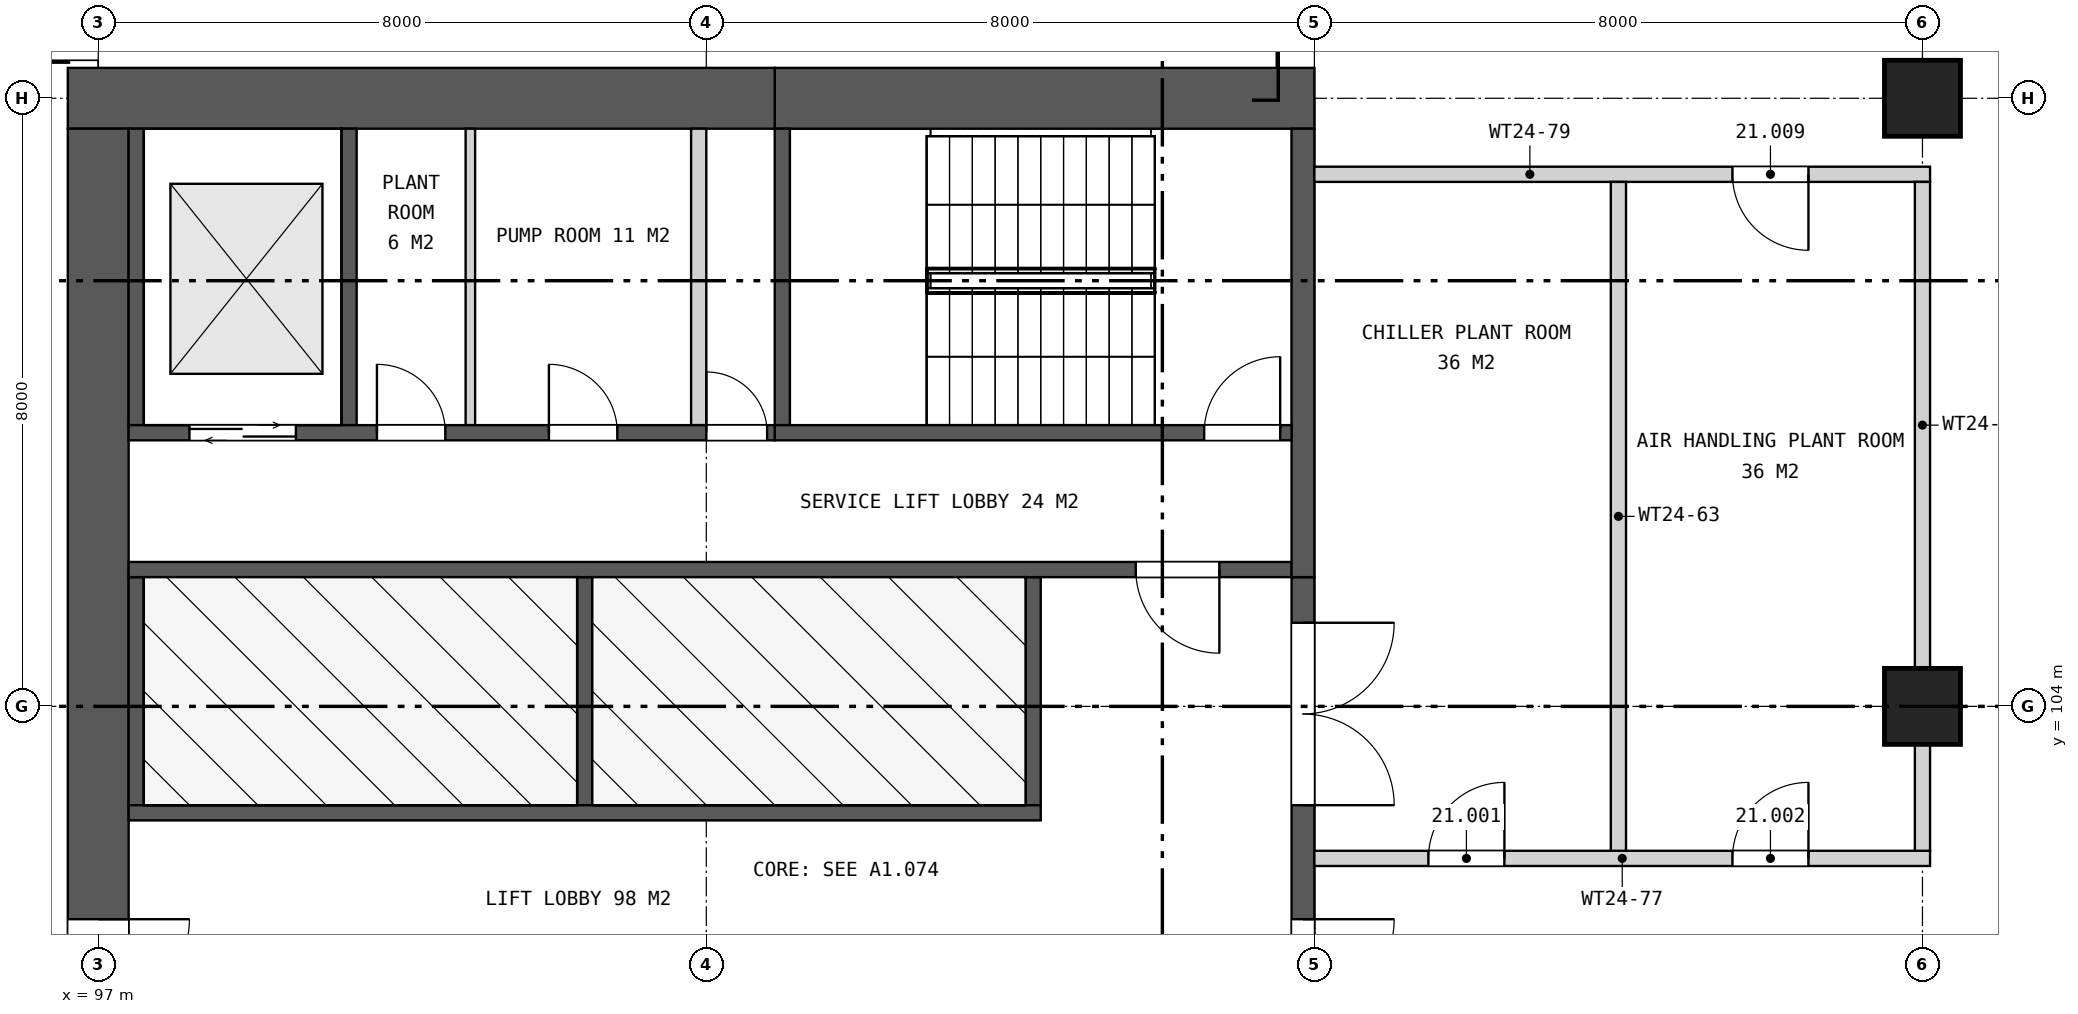
"""IFC4 building model, lengths in metres.
Left out: names, types, materials, properties, quantities, classifications, styles, units other than length and angle.
Written with IfcOpenShell. Run it as: python <this file> out.ifc"""

import sys

from ifc_helpers import new_model, si_unit, direction, frame, frame_2d, origin, origin_2d, place, context, subcontext, project, spatial, rectangle, extrude, element, fill, save


model = new_model("IFC4")
c1 = context("Model", 3, precision=1e-05, world=origin(), true_north=direction((0.0, 1.0)))
c2 = subcontext(c1, "Body", "Model", "MODEL_VIEW")
j1 = project(units=[si_unit("LENGTHUNIT", "METRE"), si_unit("PLANEANGLEUNIT", "RADIAN")], contexts=[c1])
p1 = place(None, origin())
s1 = spatial("IfcSite", under=j1, at=p1, CompositionType="ELEMENT")
p2 = place(p1, origin())
s2 = spatial("IfcBuilding", under=s1, at=p2, CompositionType="ELEMENT")
p3 = place(p2, frame((0.0, 0.0, 105.3)))
s3 = spatial("IfcBuildingStorey", under=s2, at=p3, CompositionType="ELEMENT", Elevation=105.3)
for number, where, z_axis, x_axis in (
    (1, (121.0, 104.0, 0.0), (0.0, 0.0, 1.0), (1.0, 0.0, 0.0)),
    (2, (121.0, 112.0, 0.0), (0.0, 0.0, 1.0), (1.0, 0.0, 0.0)),
):
    element("IfcColumn", number, at=place(p3, frame(where, z_axis=z_axis, x_axis=x_axis)), inside=s3, PredefinedType="COLUMN", context=c2, shape_type="SweptSolid", body=[
        extrude(rectangle(XDim=1.0, YDim=1.0, at=origin_2d()), origin(), (0.0, 0.0, 1.0), 7.4),
    ])
p4 = place(p3, frame((113.0, 112.0, 0.0), z_axis=(0.0, 0.0, 1.0), x_axis=(-1.0, 0.0, 0.0)))
e3 = element("IfcWall", 3, at=p4, inside=s3, PredefinedType="SHEAR", context=c2, shape_type="SweptSolid", body=[
    extrude(rectangle(XDim=7.1, YDim=0.8, at=frame_2d((3.55, 0.0))), origin(), (0.0, 0.0, 1.0), 7.4),
])
p5 = place(p3, frame((105.9, 112.0, 0.0), z_axis=(0.0, 0.0, 1.0), x_axis=(-1.0, 0.0, 0.0)))
e4 = element("IfcWall", 4, at=p5, inside=s3, PredefinedType="SHEAR", context=c2, shape_type="SweptSolid", body=[
    extrude(rectangle(XDim=9.3, YDim=0.8, at=frame_2d((4.65, 0.0))), origin(), (0.0, 0.0, 1.0), 7.4),
])
p6 = place(p3, frame((97.0, 111.6, 0.0), z_axis=(0.0, 0.0, 1.0), x_axis=(0.0, -1.0, 0.0)))
e5 = element("IfcWall", 5, at=p6, inside=s3, PredefinedType="SHEAR", context=c2, shape_type="SweptSolid", body=[
    extrude(rectangle(XDim=23.2, YDim=0.8, at=frame_2d((11.6, 0.0))), origin(), (0.0, 0.0, 1.0), 7.4),
])
p7 = place(p6, frame((10.4, 0.0, 0.0)))
e6 = element("IfcOpeningElement", 6, at=p7, cuts=e5, PredefinedType="OPENING", context=c2, shape_type="SweptSolid", body=[
    extrude(rectangle(XDim=2.4, YDim=2.4, at=frame_2d((1.2, 1.2))), frame((0.0, 0.41, 0.0), z_axis=(0.0, -1.0, 0.0), x_axis=(1.0, 0.0, 0.0)), (0.0, 0.0, 1.0), 0.82),
])
p8 = place(p3, frame((112.85, 105.7, 0.0), z_axis=(0.0, 0.0, 1.0), x_axis=(0.0, -1.0, 0.0)))
e7 = element("IfcWall", 7, at=p8, inside=s3, PredefinedType="SHEAR", context=c2, shape_type="SweptSolid", body=[
    extrude(rectangle(XDim=11.4, YDim=0.3, at=frame_2d((5.7, 0.0))), origin(), (0.0, 0.0, 1.0), 7.4),
])
p9 = place(p8, frame((0.6, 0.0, 0.0)))
e8 = element("IfcOpeningElement", 8, at=p9, cuts=e7, PredefinedType="OPENING", context=c2, shape_type="SweptSolid", body=[
    extrude(rectangle(XDim=2.4, YDim=2.4, at=frame_2d((1.2, 1.2))), frame((0.0, 0.16, 0.0), z_axis=(0.0, -1.0, 0.0), x_axis=(1.0, 0.0, 0.0)), (0.0, 0.0, 1.0), 0.32),
])
p10 = place(p8, frame((4.5, 0.0, 0.0)))
e9 = element("IfcOpeningElement", 9, at=p10, cuts=e7, PredefinedType="OPENING", context=c2, shape_type="SweptSolid", body=[
    extrude(rectangle(XDim=2.4, YDim=2.4, at=frame_2d((1.2, 1.2))), frame((0.0, 0.16, 0.0), z_axis=(0.0, -1.0, 0.0), x_axis=(1.0, 0.0, 0.0)), (0.0, 0.0, 1.0), 0.32),
])
p11 = place(p8, frame((8.4, 0.0, 0.0)))
e10 = element("IfcOpeningElement", 10, at=p11, cuts=e7, PredefinedType="OPENING", context=c2, shape_type="SweptSolid", body=[
    extrude(rectangle(XDim=2.4, YDim=2.4, at=frame_2d((1.2, 1.2))), frame((0.0, 0.16, 0.0), z_axis=(0.0, -1.0, 0.0), x_axis=(1.0, 0.0, 0.0)), (0.0, 0.0, 1.0), 0.32),
])
for number, where, z_axis, x_axis in (
    (11, (109.3, 105.7, 0.0), (0.0, 0.0, 1.0), (0.0, -1.0, 0.0)),
    (12, (103.4, 105.7, 0.0), (0.0, 0.0, 1.0), (0.0, -1.0, 0.0)),
    (13, (97.5, 105.7, 0.0), (0.0, 0.0, 1.0), (0.0, -1.0, 0.0)),
):
    element("IfcWall", number, at=place(p3, frame(where, z_axis=z_axis, x_axis=x_axis)), inside=s3, PredefinedType="SHEAR", context=c2, shape_type="SweptSolid", body=[
        extrude(rectangle(XDim=3.0, YDim=0.2, at=frame_2d((1.5, 0.0))), origin(), (0.0, 0.0, 1.0), 7.4),
    ])
p12 = place(p3, frame((109.4, 102.6, 0.0), z_axis=(0.0, 0.0, 1.0), x_axis=(-1.0, 0.0, 0.0)))
e14 = element("IfcWall", 14, at=p12, inside=s3, PredefinedType="SHEAR", context=c2, shape_type="SweptSolid", body=[
    extrude(rectangle(XDim=12.0, YDim=0.2, at=frame_2d((6.0, 0.0))), origin(), (0.0, 0.0, 1.0), 7.4),
])
p13 = place(p3, frame((112.7, 105.8, 0.0), z_axis=(0.0, 0.0, 1.0), x_axis=(-1.0, 0.0, 0.0)))
e15 = element("IfcWall", 15, at=p13, inside=s3, PredefinedType="SHEAR", context=c2, shape_type="SweptSolid", body=[
    extrude(rectangle(XDim=15.3, YDim=0.2, at=frame_2d((7.65, 0.0))), origin(), (0.0, 0.0, 1.0), 7.4),
])
p14 = place(p13, frame((0.95, 0.0, 0.0)))
e16 = element("IfcOpeningElement", 16, at=p14, cuts=e15, PredefinedType="OPENING", context=c2, shape_type="SweptSolid", body=[
    extrude(rectangle(XDim=1.1, YDim=2.1, at=frame_2d((0.55, 1.05))), frame((0.0, 0.11, 0.0), z_axis=(0.0, -1.0, 0.0), x_axis=(1.0, 0.0, 0.0)), (0.0, 0.0, 1.0), 0.22),
])
p15 = place(p3, frame((112.85, 111.6, 0.0), z_axis=(0.0, 0.0, 1.0), x_axis=(0.0, -1.0, 0.0)))
e17 = element("IfcWall", 17, at=p15, inside=s3, PredefinedType="SHEAR", context=c2, shape_type="SweptSolid", body=[
    extrude(rectangle(XDim=5.9, YDim=0.3, at=frame_2d((2.95, 0.0))), origin(), (0.0, 0.0, 1.0), 7.4),
])
for number, where, z_axis, x_axis in (
    (18, (106.0, 111.6, 0.0), (0.0, 0.0, 1.0), (0.0, -1.0, 0.0)),
    (19, (100.3, 111.6, 0.0), (0.0, 0.0, 1.0), (0.0, -1.0, 0.0)),
    (20, (97.5, 111.6, 0.0), (0.0, 0.0, 1.0), (0.0, -1.0, 0.0)),
):
    element("IfcWall", number, at=place(p3, frame(where, z_axis=z_axis, x_axis=x_axis)), inside=s3, PredefinedType="SHEAR", context=c2, shape_type="SweptSolid", body=[
        extrude(rectangle(XDim=3.9, YDim=0.2, at=frame_2d((1.95, 0.0))), origin(), (0.0, 0.0, 1.0), 7.4),
    ])
p16 = place(p3, frame((104.9, 111.6, 0.0), z_axis=(0.0, 0.0, 1.0), x_axis=(0.0, -1.0, 0.0)))
e21 = element("IfcWall", 21, at=p16, inside=s3, PredefinedType="PARTITIONING", context=c2, shape_type="SweptSolid", body=[
    extrude(rectangle(XDim=3.9, YDim=0.2, at=frame_2d((1.95, 0.0))), origin(), (0.0, 0.0, 1.0), 7.4),
])
p17 = place(p3, frame((101.896, 111.6, 0.0), z_axis=(0.0, 0.0, 1.0), x_axis=(0.0, -1.0, 0.0)))
e22 = element("IfcWall", 22, at=p17, inside=s3, PredefinedType="PARTITIONING", context=c2, shape_type="SweptSolid", body=[
    extrude(rectangle(XDim=3.9, YDim=0.125, at=frame_2d((1.95, 0.0))), origin(), (0.0, 0.0, 1.0), 7.4),
])
p18 = place(p3, frame((112.7, 107.6, 0.0), z_axis=(0.0, 0.0, 1.0), x_axis=(-1.0, 0.0, 0.0)))
e23 = element("IfcWall", 23, at=p18, inside=s3, PredefinedType="SHEAR", context=c2, shape_type="SweptSolid", body=[
    extrude(rectangle(XDim=6.8, YDim=0.2, at=frame_2d((3.4, 0.0))), origin(), (0.0, 0.0, 1.0), 7.4),
])
p19 = place(p18, frame((0.15, 0.0, 0.0)))
e24 = element("IfcOpeningElement", 24, at=p19, cuts=e23, PredefinedType="OPENING", context=c2, shape_type="SweptSolid", body=[
    extrude(rectangle(XDim=1.0, YDim=2.1, at=frame_2d((0.5, 1.05))), frame((0.0, 0.11, 0.0), z_axis=(0.0, -1.0, 0.0), x_axis=(1.0, 0.0, 0.0)), (0.0, 0.0, 1.0), 0.22),
])
p20 = place(p3, frame((105.9, 107.6, 0.0), z_axis=(0.0, 0.0, 1.0), x_axis=(-1.0, 0.0, 0.0)))
e25 = element("IfcWall", 25, at=p20, inside=s3, PredefinedType="SHEAR", context=c2, shape_type="SweptSolid", body=[
    extrude(rectangle(XDim=8.5, YDim=0.2, at=frame_2d((4.25, 0.0))), origin(), (0.0, 0.0, 1.0), 7.4),
])
p21 = place(p20, frame((0.1, 0.0, 0.0)))
e26 = element("IfcOpeningElement", 26, at=p21, cuts=e25, PredefinedType="OPENING", context=c2, shape_type="SweptSolid", body=[
    extrude(rectangle(XDim=0.8, YDim=2.1, at=frame_2d((0.4, 1.05))), frame((0.0, 0.11, 0.0), z_axis=(0.0, -1.0, 0.0), x_axis=(1.0, 0.0, 0.0)), (0.0, 0.0, 1.0), 0.22),
])
p22 = place(p20, frame((2.071, 0.0, 0.0)))
e27 = element("IfcOpeningElement", 27, at=p22, cuts=e25, PredefinedType="OPENING", context=c2, shape_type="SweptSolid", body=[
    extrude(rectangle(XDim=0.9, YDim=2.1, at=frame_2d((0.45, 1.05))), frame((0.0, 0.11, 0.0), z_axis=(0.0, -1.0, 0.0), x_axis=(1.0, 0.0, 0.0)), (0.0, 0.0, 1.0), 0.22),
])
p23 = place(p20, frame((4.333, 0.0, 0.0)))
e28 = element("IfcOpeningElement", 28, at=p23, cuts=e25, PredefinedType="OPENING", context=c2, shape_type="SweptSolid", body=[
    extrude(rectangle(XDim=0.9, YDim=2.1, at=frame_2d((0.45, 1.05))), frame((0.0, 0.11, 0.0), z_axis=(0.0, -1.0, 0.0), x_axis=(1.0, 0.0, 0.0)), (0.0, 0.0, 1.0), 0.22),
])
p24 = place(p20, frame((6.3, 0.0, 0.0)))
e29 = element("IfcOpeningElement", 29, at=p24, cuts=e25, PredefinedType="OPENING", context=c2, shape_type="SweptSolid", body=[
    extrude(rectangle(XDim=1.4, YDim=2.1, at=frame_2d((0.7, 1.05))), frame((0.0, 0.11, 0.0), z_axis=(0.0, -1.0, 0.0), x_axis=(1.0, 0.0, 0.0)), (0.0, 0.0, 1.0), 0.22),
])
p25 = place(p3, frame((113.0, 102.0, 0.0), z_axis=(0.0, 0.0, 1.0), x_axis=(1.0, 0.0, 0.0)))
e30 = element("IfcWall", 30, at=p25, inside=s3, PredefinedType="SOLIDWALL", context=c2, shape_type="SweptSolid", body=[
    extrude(rectangle(XDim=8.1, YDim=0.2, at=frame_2d((4.05, 0.0))), origin(), (0.0, 0.0, 1.0), 6.64),
])
p26 = place(p25, frame((1.5, 0.0, 0.0)))
e31 = element("IfcOpeningElement", 31, at=p26, cuts=e30, PredefinedType="OPENING", context=c2, shape_type="SweptSolid", body=[
    extrude(rectangle(XDim=1.0, YDim=2.2, at=frame_2d((0.5, 1.1))), frame((0.0, 0.11, 0.0), z_axis=(0.0, -1.0, 0.0), x_axis=(1.0, 0.0, 0.0)), (0.0, 0.0, 1.0), 0.22),
])
p27 = place(p25, frame((5.5, 0.0, 0.0)))
e32 = element("IfcOpeningElement", 32, at=p27, cuts=e30, PredefinedType="OPENING", context=c2, shape_type="SweptSolid", body=[
    extrude(rectangle(XDim=1.0, YDim=2.2, at=frame_2d((0.5, 1.1))), frame((0.0, 0.11, 0.0), z_axis=(0.0, -1.0, 0.0), x_axis=(1.0, 0.0, 0.0)), (0.0, 0.0, 1.0), 0.22),
])
p28 = place(p3, frame((113.0, 111.0, 0.0), z_axis=(0.0, 0.0, 1.0), x_axis=(1.0, 0.0, 0.0)))
e33 = element("IfcWall", 33, at=p28, inside=s3, PredefinedType="SOLIDWALL", context=c2, shape_type="SweptSolid", body=[
    extrude(rectangle(XDim=8.1, YDim=0.2, at=frame_2d((4.05, 0.0))), origin(), (0.0, 0.0, 1.0), 6.64),
])
p29 = place(p28, frame((5.5, 0.0, 0.0)))
e34 = element("IfcOpeningElement", 34, at=p29, cuts=e33, PredefinedType="OPENING", context=c2, shape_type="SweptSolid", body=[
    extrude(rectangle(XDim=1.0, YDim=2.2, at=frame_2d((0.5, 1.1))), frame((0.0, 0.11, 0.0), z_axis=(0.0, -1.0, 0.0), x_axis=(1.0, 0.0, 0.0)), (0.0, 0.0, 1.0), 0.22),
])
p30 = place(p3, frame((117.0, 102.1, 0.0), z_axis=(0.0, 0.0, 1.0), x_axis=(0.0, 1.0, 0.0)))
e35 = element("IfcWall", 35, at=p30, inside=s3, PredefinedType="SOLIDWALL", context=c2, shape_type="SweptSolid", body=[
    extrude(rectangle(XDim=8.8, YDim=0.2, at=frame_2d((4.4, 0.0))), origin(), (0.0, 0.0, 1.0), 6.636),
])
p31 = place(p3, frame((121.0, 102.1, 0.0), z_axis=(0.0, 0.0, 1.0), x_axis=(0.0, 1.0, 0.0)))
e36 = element("IfcWall", 36, at=p31, inside=s3, PredefinedType="SOLIDWALL", context=c2, shape_type="SweptSolid", body=[
    extrude(rectangle(XDim=1.4, YDim=0.2, at=frame_2d((0.7, 0.0))), origin(), (0.0, 0.0, 1.0), 6.64),
])
p32 = place(p3, frame((121.0, 104.5, 0.0), z_axis=(0.0, 0.0, 1.0), x_axis=(0.0, 1.0, 0.0)))
e37 = element("IfcWall", 37, at=p32, inside=s3, PredefinedType="SOLIDWALL", context=c2, shape_type="SweptSolid", body=[
    extrude(rectangle(XDim=6.4, YDim=0.2, at=frame_2d((3.2, 0.0))), origin(), (0.0, 0.0, 1.0), 6.64),
])
p33 = place(p7, origin())
e38 = element("IfcDoor", 38, at=p33, inside=s3, OperationType="DOUBLE_DOOR_SINGLE_SWING", PredefinedType="DOOR", context=c2, shape_type="SweptSolid", body=[
    extrude(rectangle(XDim=2.4, YDim=2.4, at=frame_2d((1.2, 1.2))), frame((0.0, 0.025, 0.0), z_axis=(0.0, -1.0, 0.0), x_axis=(1.0, 0.0, 0.0)), (0.0, 0.0, 1.0), 0.05),
])
fill(e6, e38)
p34 = place(p9, origin())
e39 = element("IfcDoor", 39, at=p34, inside=s3, OperationType="DOUBLE_DOOR_SINGLE_SWING", PredefinedType="DOOR", context=c2, shape_type="SweptSolid", body=[
    extrude(rectangle(XDim=2.4, YDim=2.4, at=frame_2d((1.2, 1.2))), frame((0.0, 0.025, 0.0), z_axis=(0.0, -1.0, 0.0), x_axis=(1.0, 0.0, 0.0)), (0.0, 0.0, 1.0), 0.05),
])
fill(e8, e39)
p35 = place(p10, origin())
e40 = element("IfcDoor", 40, at=p35, inside=s3, OperationType="DOUBLE_DOOR_SINGLE_SWING", PredefinedType="DOOR", context=c2, shape_type="SweptSolid", body=[
    extrude(rectangle(XDim=2.4, YDim=2.4, at=frame_2d((1.2, 1.2))), frame((0.0, 0.025, 0.0), z_axis=(0.0, -1.0, 0.0), x_axis=(1.0, 0.0, 0.0)), (0.0, 0.0, 1.0), 0.05),
])
fill(e9, e40)
p36 = place(p14, origin())
e41 = element("IfcDoor", 41, at=p36, inside=s3, OperationType="SINGLE_SWING_LEFT", PredefinedType="DOOR", context=c2, shape_type="SweptSolid", body=[
    extrude(rectangle(XDim=1.1, YDim=2.1, at=frame_2d((0.55, 1.05))), frame((0.0, 0.025, 0.0), z_axis=(0.0, -1.0, 0.0), x_axis=(1.0, 0.0, 0.0)), (0.0, 0.0, 1.0), 0.05),
])
fill(e16, e41)
p37 = place(p19, frame((1.0, 0.0, 0.0), z_axis=(0.0, 0.0, 1.0), x_axis=(-1.0, 0.0, 0.0)))
e42 = element("IfcDoor", 42, at=p37, inside=s3, OperationType="SINGLE_SWING_RIGHT", PredefinedType="DOOR", context=c2, shape_type="SweptSolid", body=[
    extrude(rectangle(XDim=1.0, YDim=2.1, at=frame_2d((0.5, 1.05))), frame((0.0, 0.025, 0.0), z_axis=(0.0, -1.0, 0.0), x_axis=(1.0, 0.0, 0.0)), (0.0, 0.0, 1.0), 0.05),
])
fill(e24, e42)
p38 = place(p21, frame((0.8, 0.0, 0.0), z_axis=(0.0, 0.0, 1.0), x_axis=(-1.0, 0.0, 0.0)))
e43 = element("IfcDoor", 43, at=p38, inside=s3, OperationType="SINGLE_SWING_LEFT", PredefinedType="DOOR", context=c2, shape_type="SweptSolid", body=[
    extrude(rectangle(XDim=0.8, YDim=2.1, at=frame_2d((0.4, 1.05))), frame((0.0, 0.025, 0.0), z_axis=(0.0, -1.0, 0.0), x_axis=(1.0, 0.0, 0.0)), (0.0, 0.0, 1.0), 0.05),
])
fill(e26, e43)
p39 = place(p22, frame((0.9, 0.0, 0.0), z_axis=(0.0, 0.0, 1.0), x_axis=(-1.0, 0.0, 0.0)))
e44 = element("IfcDoor", 44, at=p39, inside=s3, OperationType="SINGLE_SWING_LEFT", PredefinedType="DOOR", context=c2, shape_type="SweptSolid", body=[
    extrude(rectangle(XDim=0.9, YDim=2.1, at=frame_2d((0.45, 1.05))), frame((0.0, 0.025, 0.0), z_axis=(0.0, -1.0, 0.0), x_axis=(1.0, 0.0, 0.0)), (0.0, 0.0, 1.0), 0.05),
])
fill(e27, e44)
p40 = place(p23, frame((0.9, 0.0, 0.0), z_axis=(0.0, 0.0, 1.0), x_axis=(-1.0, 0.0, 0.0)))
e45 = element("IfcDoor", 45, at=p40, inside=s3, OperationType="SINGLE_SWING_LEFT", PredefinedType="DOOR", context=c2, shape_type="SweptSolid", body=[
    extrude(rectangle(XDim=0.9, YDim=2.1, at=frame_2d((0.45, 1.05))), frame((0.0, 0.025, 0.0), z_axis=(0.0, -1.0, 0.0), x_axis=(1.0, 0.0, 0.0)), (0.0, 0.0, 1.0), 0.05),
])
fill(e28, e45)
p41 = place(p24, origin())
e46 = element("IfcDoor", 46, at=p41, inside=s3, OperationType="DOUBLE_DOOR_SLIDING", PredefinedType="DOOR", context=c2, shape_type="SweptSolid", body=[
    extrude(rectangle(XDim=1.4, YDim=2.1, at=frame_2d((0.7, 1.05))), frame((0.0, 0.025, 0.0), z_axis=(0.0, -1.0, 0.0), x_axis=(1.0, 0.0, 0.0)), (0.0, 0.0, 1.0), 0.05),
])
fill(e29, e46)
p42 = place(p26, origin())
e47 = element("IfcDoor", 47, at=p42, inside=s3, OperationType="SINGLE_SWING_RIGHT", PredefinedType="DOOR", context=c2, shape_type="SweptSolid", body=[
    extrude(rectangle(XDim=1.0, YDim=2.2, at=frame_2d((0.5, 1.1))), frame((0.0, 0.025, 0.0), z_axis=(0.0, -1.0, 0.0), x_axis=(1.0, 0.0, 0.0)), (0.0, 0.0, 1.0), 0.05),
])
fill(e31, e47)
p43 = place(p27, origin())
e48 = element("IfcDoor", 48, at=p43, inside=s3, OperationType="SINGLE_SWING_RIGHT", PredefinedType="DOOR", context=c2, shape_type="SweptSolid", body=[
    extrude(rectangle(XDim=1.0, YDim=2.2, at=frame_2d((0.5, 1.1))), frame((0.0, 0.025, 0.0), z_axis=(0.0, -1.0, 0.0), x_axis=(1.0, 0.0, 0.0)), (0.0, 0.0, 1.0), 0.05),
])
fill(e32, e48)
p44 = place(p29, frame((1.0, 0.0, 0.0), z_axis=(0.0, 0.0, 1.0), x_axis=(-1.0, 0.0, 0.0)))
e49 = element("IfcDoor", 49, at=p44, inside=s3, OperationType="SINGLE_SWING_LEFT", PredefinedType="DOOR", context=c2, shape_type="SweptSolid", body=[
    extrude(rectangle(XDim=1.0, YDim=2.2, at=frame_2d((0.5, 1.1))), frame((0.0, 0.025, 0.0), z_axis=(0.0, -1.0, 0.0), x_axis=(1.0, 0.0, 0.0)), (0.0, 0.0, 1.0), 0.05),
])
fill(e34, e49)
save(model, sys.argv[1])
